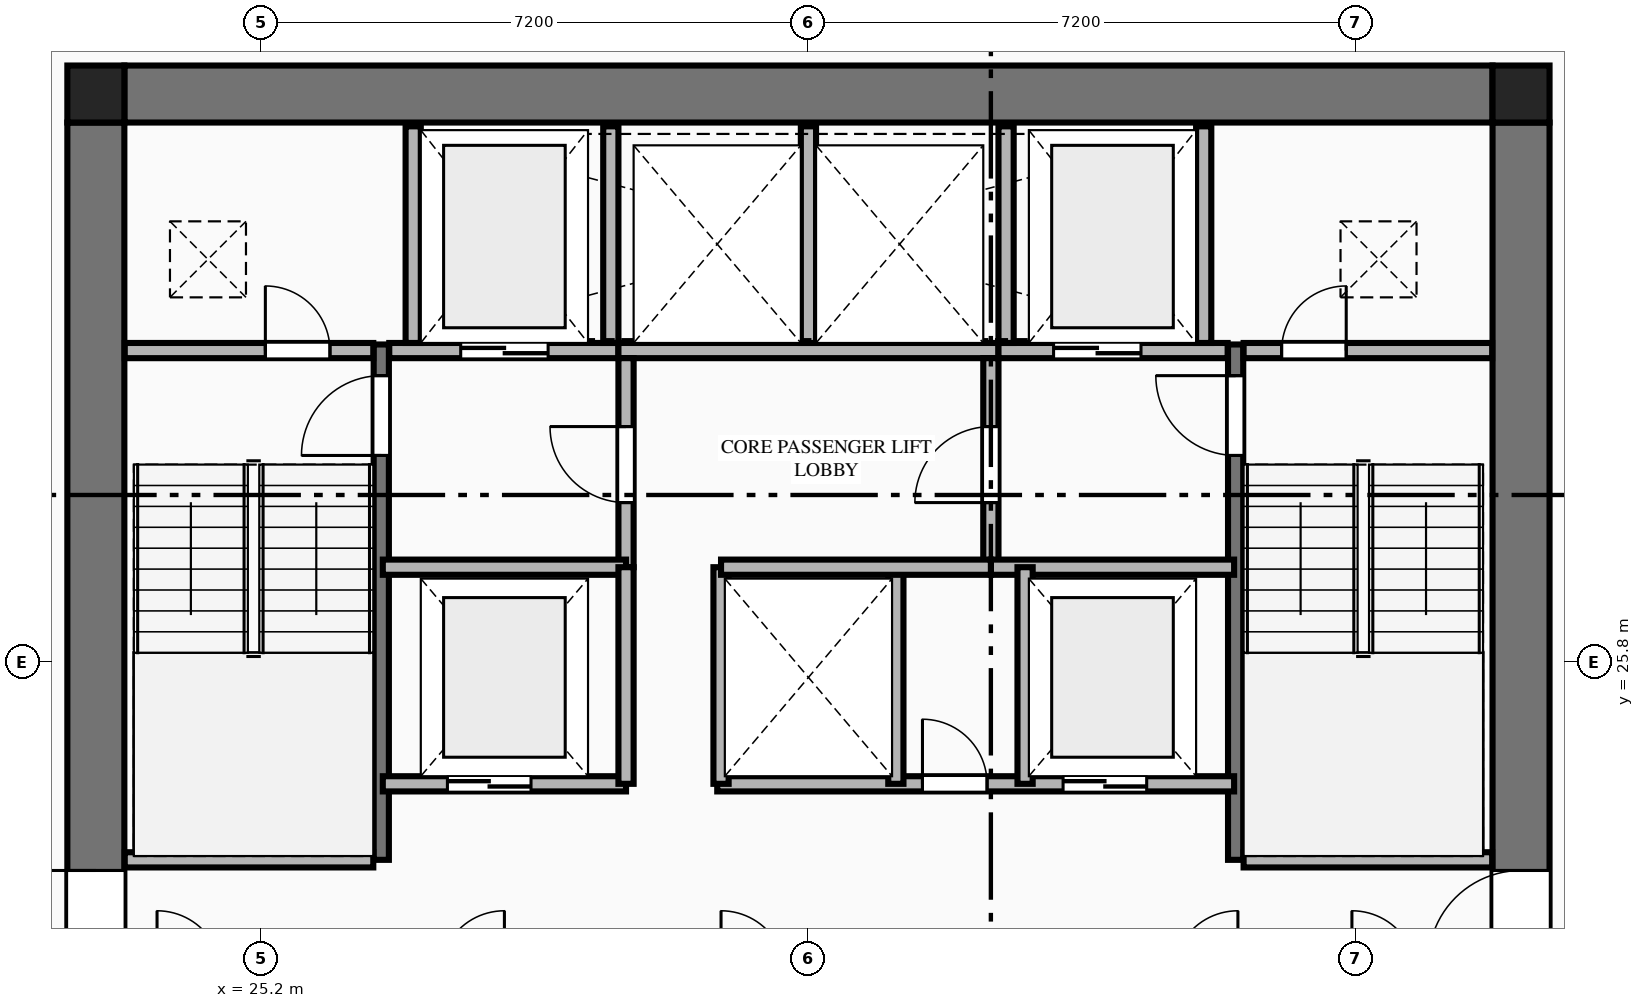
"""IFC4 building model, lengths in metres.
Left out: names, types, materials, properties, quantities, classifications, styles, units other than length and angle.
Written with IfcOpenShell. Run it as: python <this file> out.ifc"""

import sys

from ifc_helpers import new_model, si_unit, direction, frame, frame_2d, origin, origin_2d, place, context, subcontext, project, spatial, rectangle, extrude, element, fill, save


model = new_model("IFC4")
c1 = context("Model", 3, precision=1e-05, world=origin(), true_north=direction((0.0, 1.0)))
c2 = subcontext(c1, "Body", "Model", "MODEL_VIEW")
j1 = project(units=[si_unit("LENGTHUNIT", "METRE"), si_unit("PLANEANGLEUNIT", "RADIAN")], contexts=[c1])
p1 = place(None, origin())
s1 = spatial("IfcSite", under=j1, at=p1, CompositionType="ELEMENT")
p2 = place(p1, origin())
s2 = spatial("IfcBuilding", under=s1, at=p2, CompositionType="ELEMENT")
p3 = place(p2, frame((0.0, 0.0, 109.05)))
s3 = spatial("IfcBuildingStorey", under=s2, at=p3, CompositionType="ELEMENT", Elevation=109.05)
for number, where, z_axis, x_axis in (
    (1, (41.775, 33.275, 0.0), (0.0, 0.0, 1.0), (1.0, 0.0, 0.0)),
    (2, (23.025, 33.275, 0.0), (0.0, 0.0, 1.0), (1.0, 0.0, 0.0)),
):
    element("IfcColumn", number, at=place(p3, frame(where, z_axis=z_axis, x_axis=x_axis)), inside=s3, PredefinedType="COLUMN", context=c2, shape_type="SweptSolid", body=[
        extrude(rectangle(XDim=0.75, YDim=0.75, at=origin_2d()), origin(), (0.0, 0.0, 1.0), 3.55),
    ])
p4 = place(p3, frame((23.4, 33.275, 0.0), z_axis=(0.0, 0.0, 1.0), x_axis=(1.0, 0.0, 0.0)))
e3 = element("IfcWall", 3, at=p4, inside=s3, PredefinedType="SHEAR", context=c2, shape_type="SweptSolid", body=[
    extrude(rectangle(XDim=18.0, YDim=0.75, at=frame_2d((9.0, 0.0))), origin(), (0.0, 0.0, 1.0), 3.34),
])
p5 = place(p3, frame((23.025, 18.9, 0.0), z_axis=(0.0, 0.0, 1.0), x_axis=(0.0, 1.0, 0.0)))
e4 = element("IfcWall", 4, at=p5, inside=s3, PredefinedType="SHEAR", context=c2, shape_type="SweptSolid", body=[
    extrude(rectangle(XDim=14.0, YDim=0.75, at=frame_2d((7.0, 0.0))), origin(), (0.0, 0.0, 1.0), 3.34),
])
p6 = place(p5, frame((2.94, 0.0, 0.0)))
e5 = element("IfcOpeningElement", 5, at=p6, cuts=e4, PredefinedType="OPENING", context=c2, shape_type="SweptSolid", body=[
    extrude(rectangle(XDim=1.22, YDim=2.25, at=frame_2d((0.61, 1.125))), frame((0.0, 0.385, 0.0), z_axis=(0.0, -1.0, 0.0), x_axis=(1.0, 0.0, 0.0)), (0.0, 0.0, 1.0), 0.77),
])
p7 = place(p3, frame((41.775, 18.9, 0.0), z_axis=(0.0, 0.0, 1.0), x_axis=(0.0, 1.0, 0.0)))
e6 = element("IfcWall", 6, at=p7, inside=s3, PredefinedType="SHEAR", context=c2, shape_type="SweptSolid", body=[
    extrude(rectangle(XDim=14.0, YDim=0.75, at=frame_2d((7.0, 0.0))), origin(), (0.0, 0.0, 1.0), 3.34),
])
p8 = place(p7, frame((2.94, 0.0, 0.0)))
e7 = element("IfcOpeningElement", 7, at=p8, cuts=e6, PredefinedType="OPENING", context=c2, shape_type="SweptSolid", body=[
    extrude(rectangle(XDim=1.22, YDim=2.25, at=frame_2d((0.61, 1.125))), frame((0.0, 0.385, 0.0), z_axis=(0.0, -1.0, 0.0), x_axis=(1.0, 0.0, 0.0)), (0.0, 0.0, 1.0), 0.77),
])
p9 = place(p3, frame((26.78, 23.2, 0.0), z_axis=(0.0, 0.0, 1.0), x_axis=(0.0, 1.0, 0.0)))
e8 = element("IfcWall", 8, at=p9, inside=s3, PredefinedType="SHEAR", context=c2, shape_type="SweptSolid", body=[
    extrude(rectangle(XDim=6.78, YDim=0.2, at=frame_2d((3.39, 0.0))), origin(), (0.0, 0.0, 1.0), 3.55),
])
p10 = place(p9, frame((5.32, 0.0, 0.0)))
e9 = element("IfcOpeningElement", 9, at=p10, cuts=e8, PredefinedType="OPENING", context=c2, shape_type="SweptSolid", body=[
    extrude(rectangle(XDim=1.05, YDim=2.15, at=frame_2d((0.525, 1.075))), frame((0.0, 0.11, 0.0), z_axis=(0.0, -1.0, 0.0), x_axis=(1.0, 0.0, 0.0)), (0.0, 0.0, 1.0), 0.22),
])
p11 = place(p3, frame((23.405, 23.2, 0.0), z_axis=(0.0, 0.0, 1.0), x_axis=(1.0, 0.0, 0.0)))
e10 = element("IfcWall", 10, at=p11, inside=s3, PredefinedType="PLUMBINGWALL", context=c2, shape_type="SweptSolid", body=[
    extrude(rectangle(XDim=3.27, YDim=0.2, at=frame_2d((1.635, 0.0))), origin(), (0.0, 0.0, 1.0), 3.34),
])
p12 = place(p3, frame((38.02, 23.2, 0.0), z_axis=(0.0, 0.0, 1.0), x_axis=(0.0, 1.0, 0.0)))
e11 = element("IfcWall", 11, at=p12, inside=s3, PredefinedType="SHEAR", context=c2, shape_type="SweptSolid", body=[
    extrude(rectangle(XDim=6.78, YDim=0.2, at=frame_2d((3.39, 0.0))), origin(), (0.0, 0.0, 1.0), 3.55),
])
p13 = place(p12, frame((5.32, 0.0, 0.0)))
e12 = element("IfcOpeningElement", 12, at=p13, cuts=e11, PredefinedType="OPENING", context=c2, shape_type="SweptSolid", body=[
    extrude(rectangle(XDim=1.05, YDim=2.15, at=frame_2d((0.525, 1.075))), frame((0.0, 0.11, 0.0), z_axis=(0.0, -1.0, 0.0), x_axis=(1.0, 0.0, 0.0)), (0.0, 0.0, 1.0), 0.22),
])
p14 = place(p3, frame((38.125, 23.2, 0.0), z_axis=(0.0, 0.0, 1.0), x_axis=(1.0, 0.0, 0.0)))
e13 = element("IfcWall", 13, at=p14, inside=s3, PredefinedType="PLUMBINGWALL", context=c2, shape_type="SweptSolid", body=[
    extrude(rectangle(XDim=3.27, YDim=0.2, at=frame_2d((1.635, 0.0))), origin(), (0.0, 0.0, 1.0), 3.34),
])
p15 = place(p3, frame((23.405, 29.9, 0.0), z_axis=(0.0, 0.0, 1.0), x_axis=(1.0, 0.0, 0.0)))
e14 = element("IfcWall", 14, at=p15, inside=s3, PredefinedType="PLUMBINGWALL", context=c2, shape_type="SweptSolid", body=[
    extrude(rectangle(XDim=3.27, YDim=0.2, at=frame_2d((1.635, 0.0))), origin(), (0.0, 0.0, 1.0), 3.34),
])
p16 = place(p15, frame((1.85, 0.0, 0.0)))
e15 = element("IfcOpeningElement", 15, at=p16, cuts=e14, PredefinedType="OPENING", context=c2, shape_type="SweptSolid", body=[
    extrude(rectangle(XDim=0.85, YDim=2.05, at=frame_2d((0.425, 1.025))), frame((0.0, 0.11, 0.0), z_axis=(0.0, -1.0, 0.0), x_axis=(1.0, 0.0, 0.0)), (0.0, 0.0, 1.0), 0.22),
])
p17 = place(p3, frame((26.885, 29.9, 0.0), z_axis=(0.0, 0.0, 1.0), x_axis=(1.0, 0.0, 0.0)))
e16 = element("IfcWall", 16, at=p17, inside=s3, PredefinedType="PLUMBINGWALL", context=c2, shape_type="SweptSolid", body=[
    extrude(rectangle(XDim=3.015, YDim=0.2, at=frame_2d((1.507, 0.0))), origin(), (0.0, 0.0, 1.0), 3.34),
])
p18 = place(p17, frame((0.94, 0.0, 0.0)))
e17 = element("IfcOpeningElement", 17, at=p18, cuts=e16, PredefinedType="OPENING", context=c2, shape_type="SweptSolid", body=[
    extrude(rectangle(XDim=1.15, YDim=2.2, at=frame_2d((0.575, 1.1))), frame((0.0, 0.11, 0.0), z_axis=(0.0, -1.0, 0.0), x_axis=(1.0, 0.0, 0.0)), (0.0, 0.0, 1.0), 0.22),
])
p19 = place(p3, frame((29.9, 29.9, 0.0), z_axis=(0.0, 0.0, 1.0), x_axis=(1.0, 0.0, 0.0)))
e18 = element("IfcWall", 18, at=p19, inside=s3, PredefinedType="PLUMBINGWALL", context=c2, shape_type="SweptSolid", body=[
    extrude(rectangle(XDim=5.0, YDim=0.2, at=frame_2d((2.5, 0.0))), origin(), (0.0, 0.0, 1.0), 3.34),
])
p20 = place(p3, frame((34.9, 29.9, 0.0), z_axis=(0.0, 0.0, 1.0), x_axis=(1.0, 0.0, 0.0)))
e19 = element("IfcWall", 19, at=p20, inside=s3, PredefinedType="PLUMBINGWALL", context=c2, shape_type="SweptSolid", body=[
    extrude(rectangle(XDim=3.015, YDim=0.2, at=frame_2d((1.508, 0.0))), origin(), (0.0, 0.0, 1.0), 3.34),
])
p21 = place(p20, frame((0.725, 0.0, 0.0)))
e20 = element("IfcOpeningElement", 20, at=p21, cuts=e19, PredefinedType="OPENING", context=c2, shape_type="SweptSolid", body=[
    extrude(rectangle(XDim=1.15, YDim=2.2, at=frame_2d((0.575, 1.1))), frame((0.0, 0.11, 0.0), z_axis=(0.0, -1.0, 0.0), x_axis=(1.0, 0.0, 0.0)), (0.0, 0.0, 1.0), 0.22),
])
p22 = place(p3, frame((38.125, 29.9, 0.0), z_axis=(0.0, 0.0, 1.0), x_axis=(1.0, 0.0, 0.0)))
e21 = element("IfcWall", 21, at=p22, inside=s3, PredefinedType="PLUMBINGWALL", context=c2, shape_type="SweptSolid", body=[
    extrude(rectangle(XDim=3.27, YDim=0.2, at=frame_2d((1.635, 0.0))), origin(), (0.0, 0.0, 1.0), 3.34),
])
p23 = place(p22, frame((0.5, 0.0, 0.0)))
e22 = element("IfcOpeningElement", 22, at=p23, cuts=e21, PredefinedType="OPENING", context=c2, shape_type="SweptSolid", body=[
    extrude(rectangle(XDim=0.85, YDim=2.05, at=frame_2d((0.425, 1.025))), frame((0.0, 0.11, 0.0), z_axis=(0.0, -1.0, 0.0), x_axis=(1.0, 0.0, 0.0)), (0.0, 0.0, 1.0), 0.22),
])
for number, where, z_axis, x_axis in (
    (23, (27.2, 30.0, 0.0), (0.0, 0.0, 1.0), (0.0, 1.0, 0.0)),
    (24, (29.8, 30.0, 0.0), (0.0, 0.0, 1.0), (0.0, 1.0, 0.0)),
    (25, (32.4, 30.0, 0.0), (0.0, 0.0, 1.0), (0.0, 1.0, 0.0)),
    (26, (35.0, 30.0, 0.0), (0.0, 0.0, 1.0), (0.0, 1.0, 0.0)),
    (27, (37.6, 30.0, 0.0), (0.0, 0.0, 1.0), (0.0, 1.0, 0.0)),
):
    element("IfcWall", number, at=place(p3, frame(where, z_axis=z_axis, x_axis=x_axis)), inside=s3, PredefinedType="PLUMBINGWALL", context=c2, shape_type="SweptSolid", body=[
        extrude(rectangle(XDim=2.85, YDim=0.2, at=frame_2d((1.425, 0.0))), origin(), (0.0, 0.0, 1.0), 3.34),
    ])
p24 = place(p3, frame((30.0, 27.05, 0.0), z_axis=(0.0, 0.0, 1.0), x_axis=(0.0, 1.0, 0.0)))
e28 = element("IfcWall", 28, at=p24, inside=s3, PredefinedType="PLUMBINGWALL", context=c2, shape_type="SweptSolid", body=[
    extrude(rectangle(XDim=2.75, YDim=0.2, at=frame_2d((1.375, 0.0))), origin(), (0.0, 0.0, 1.0), 3.34),
])
p25 = place(p24, frame((0.85, 0.0, 0.0)))
e29 = element("IfcOpeningElement", 29, at=p25, cuts=e28, PredefinedType="OPENING", context=c2, shape_type="SweptSolid", body=[
    extrude(rectangle(XDim=1.0, YDim=2.15, at=frame_2d((0.5, 1.075))), frame((0.0, 0.11, 0.0), z_axis=(0.0, -1.0, 0.0), x_axis=(1.0, 0.0, 0.0)), (0.0, 0.0, 1.0), 0.22),
])
p26 = place(p3, frame((26.8, 27.05, 0.0), z_axis=(0.0, 0.0, 1.0), x_axis=(1.0, 0.0, 0.0)))
e30 = element("IfcWall", 30, at=p26, inside=s3, PredefinedType="PLUMBINGWALL", context=c2, shape_type="SweptSolid", body=[
    extrude(rectangle(XDim=3.2, YDim=0.2, at=frame_2d((1.6, 0.0))), origin(), (0.0, 0.0, 1.0), 3.34),
])
p27 = place(p3, frame((34.8, 27.05, 0.0), z_axis=(0.0, 0.0, 1.0), x_axis=(0.0, 1.0, 0.0)))
e31 = element("IfcWall", 31, at=p27, inside=s3, PredefinedType="PLUMBINGWALL", context=c2, shape_type="SweptSolid", body=[
    extrude(rectangle(XDim=2.75, YDim=0.2, at=frame_2d((1.375, 0.0))), origin(), (0.0, 0.0, 1.0), 3.34),
])
p28 = place(p27, frame((0.85, 0.0, 0.0)))
e32 = element("IfcOpeningElement", 32, at=p28, cuts=e31, PredefinedType="OPENING", context=c2, shape_type="SweptSolid", body=[
    extrude(rectangle(XDim=1.0, YDim=2.15, at=frame_2d((0.5, 1.075))), frame((0.0, 0.11, 0.0), z_axis=(0.0, -1.0, 0.0), x_axis=(1.0, 0.0, 0.0)), (0.0, 0.0, 1.0), 0.22),
])
p29 = place(p3, frame((34.8, 27.05, 0.0), z_axis=(0.0, 0.0, 1.0), x_axis=(1.0, 0.0, 0.0)))
e33 = element("IfcWall", 33, at=p29, inside=s3, PredefinedType="PLUMBINGWALL", context=c2, shape_type="SweptSolid", body=[
    extrude(rectangle(XDim=3.2, YDim=0.2, at=frame_2d((1.6, 0.0))), origin(), (0.0, 0.0, 1.0), 3.34),
])
p30 = place(p3, frame((26.8, 24.2, 0.0), z_axis=(0.0, 0.0, 1.0), x_axis=(1.0, 0.0, 0.0)))
e34 = element("IfcWall", 34, at=p30, inside=s3, PredefinedType="PLUMBINGWALL", context=c2, shape_type="SweptSolid", body=[
    extrude(rectangle(XDim=3.2, YDim=0.2, at=frame_2d((1.6, 0.0))), origin(), (0.0, 0.0, 1.0), 3.34),
])
p31 = place(p30, frame((0.85, 0.0, 0.0)))
e35 = element("IfcOpeningElement", 35, at=p31, cuts=e34, PredefinedType="OPENING", context=c2, shape_type="SweptSolid", body=[
    extrude(rectangle(XDim=1.1, YDim=2.2, at=frame_2d((0.55, 1.1))), frame((0.0, 0.11, 0.0), z_axis=(0.0, -1.0, 0.0), x_axis=(1.0, 0.0, 0.0)), (0.0, 0.0, 1.0), 0.22),
])
p32 = place(p3, frame((30.0, 24.2, 0.0), z_axis=(0.0, 0.0, 1.0), x_axis=(0.0, 1.0, 0.0)))
e36 = element("IfcWall", 36, at=p32, inside=s3, PredefinedType="PLUMBINGWALL", context=c2, shape_type="SweptSolid", body=[
    extrude(rectangle(XDim=2.85, YDim=0.2, at=frame_2d((1.425, 0.0))), origin(), (0.0, 0.0, 1.0), 3.34),
])
p33 = place(p3, frame((31.2, 24.2, 0.0), z_axis=(0.0, 0.0, 1.0), x_axis=(1.0, 0.0, 0.0)))
e37 = element("IfcWall", 37, at=p33, inside=s3, PredefinedType="PLUMBINGWALL", context=c2, shape_type="SweptSolid", body=[
    extrude(rectangle(XDim=6.8, YDim=0.2, at=frame_2d((3.4, 0.0))), origin(), (0.0, 0.0, 1.0), 3.34),
])
p34 = place(p33, frame((2.7, 0.0, 0.0)))
e38 = element("IfcOpeningElement", 38, at=p34, cuts=e37, PredefinedType="OPENING", context=c2, shape_type="SweptSolid", body=[
    extrude(rectangle(XDim=0.85, YDim=2.05, at=frame_2d((0.425, 1.025))), frame((0.0, 0.11, 0.0), z_axis=(0.0, -1.0, 0.0), x_axis=(1.0, 0.0, 0.0)), (0.0, 0.0, 1.0), 0.22),
])
p35 = place(p33, frame((4.55, 0.0, 0.0)))
e39 = element("IfcOpeningElement", 39, at=p35, cuts=e37, PredefinedType="OPENING", context=c2, shape_type="SweptSolid", body=[
    extrude(rectangle(XDim=1.1, YDim=2.2, at=frame_2d((0.55, 1.1))), frame((0.0, 0.11, 0.0), z_axis=(0.0, -1.0, 0.0), x_axis=(1.0, 0.0, 0.0)), (0.0, 0.0, 1.0), 0.22),
])
for number, where, z_axis, x_axis in (
    (40, (31.25, 24.2, 0.0), (0.0, 0.0, 1.0), (0.0, 1.0, 0.0)),
    (41, (33.55, 24.2, 0.0), (0.0, 0.0, 1.0), (0.0, 1.0, 0.0)),
    (42, (35.25, 24.2, 0.0), (0.0, 0.0, 1.0), (0.0, 1.0, 0.0)),
):
    element("IfcWall", number, at=place(p3, frame(where, z_axis=z_axis, x_axis=x_axis)), inside=s3, PredefinedType="PLUMBINGWALL", context=c2, shape_type="SweptSolid", body=[
        extrude(rectangle(XDim=2.85, YDim=0.2, at=frame_2d((1.425, 0.0))), origin(), (0.0, 0.0, 1.0), 3.34),
    ])
p36 = place(p3, frame((31.25, 27.05, 0.0), z_axis=(0.0, 0.0, 1.0), x_axis=(1.0, 0.0, 0.0)))
e43 = element("IfcWall", 43, at=p36, inside=s3, PredefinedType="PLUMBINGWALL", context=c2, shape_type="SweptSolid", body=[
    extrude(rectangle(XDim=3.55, YDim=0.2, at=frame_2d((1.775, 0.0))), origin(), (0.0, 0.0, 1.0), 3.34),
])
p37 = place(p6, origin())
e44 = element("IfcDoor", 44, at=p37, inside=s3, OperationType="SINGLE_SWING_RIGHT", PredefinedType="DOOR", context=c2, shape_type="SweptSolid", body=[
    extrude(rectangle(XDim=1.22, YDim=2.25, at=frame_2d((0.61, 1.125))), frame((0.0, 0.025, 0.0), z_axis=(0.0, -1.0, 0.0), x_axis=(1.0, 0.0, 0.0)), (0.0, 0.0, 1.0), 0.05),
])
fill(e5, e44)
p38 = place(p8, origin())
e45 = element("IfcDoor", 45, at=p38, inside=s3, OperationType="SINGLE_SWING_LEFT", PredefinedType="DOOR", context=c2, shape_type="SweptSolid", body=[
    extrude(rectangle(XDim=1.22, YDim=2.25, at=frame_2d((0.61, 1.125))), frame((0.0, 0.025, 0.0), z_axis=(0.0, -1.0, 0.0), x_axis=(1.0, 0.0, 0.0)), (0.0, 0.0, 1.0), 0.05),
])
fill(e7, e45)
p39 = place(p10, origin())
e46 = element("IfcDoor", 46, at=p39, inside=s3, OperationType="SINGLE_SWING_LEFT", PredefinedType="DOOR", context=c2, shape_type="SweptSolid", body=[
    extrude(rectangle(XDim=1.05, YDim=2.15, at=frame_2d((0.525, 1.075))), frame((0.0, 0.025, 0.0), z_axis=(0.0, -1.0, 0.0), x_axis=(1.0, 0.0, 0.0)), (0.0, 0.0, 1.0), 0.05),
])
fill(e9, e46)
p40 = place(p13, origin())
e47 = element("IfcDoor", 47, at=p40, inside=s3, OperationType="SINGLE_SWING_RIGHT", PredefinedType="DOOR", context=c2, shape_type="SweptSolid", body=[
    extrude(rectangle(XDim=1.05, YDim=2.15, at=frame_2d((0.525, 1.075))), frame((0.0, 0.025, 0.0), z_axis=(0.0, -1.0, 0.0), x_axis=(1.0, 0.0, 0.0)), (0.0, 0.0, 1.0), 0.05),
])
fill(e12, e47)
p41 = place(p16, origin())
e48 = element("IfcDoor", 48, at=p41, inside=s3, OperationType="SINGLE_SWING_LEFT", PredefinedType="DOOR", context=c2, shape_type="SweptSolid", body=[
    extrude(rectangle(XDim=0.85, YDim=2.05, at=frame_2d((0.425, 1.025))), frame((0.0, 0.025, 0.0), z_axis=(0.0, -1.0, 0.0), x_axis=(1.0, 0.0, 0.0)), (0.0, 0.0, 1.0), 0.05),
])
fill(e15, e48)
p42 = place(p23, origin())
e49 = element("IfcDoor", 49, at=p42, inside=s3, OperationType="SINGLE_SWING_RIGHT", PredefinedType="DOOR", context=c2, shape_type="SweptSolid", body=[
    extrude(rectangle(XDim=0.85, YDim=2.05, at=frame_2d((0.425, 1.025))), frame((0.0, 0.025, 0.0), z_axis=(0.0, -1.0, 0.0), x_axis=(1.0, 0.0, 0.0)), (0.0, 0.0, 1.0), 0.05),
])
fill(e22, e49)
p43 = place(p18, origin())
e50 = element("IfcDoor", 50, at=p43, inside=s3, OperationType="DOUBLE_DOOR_SLIDING", PredefinedType="DOOR", context=c2, shape_type="SweptSolid", body=[
    extrude(rectangle(XDim=1.15, YDim=2.2, at=frame_2d((0.575, 1.1))), frame((0.0, 0.025, 0.0), z_axis=(0.0, -1.0, 0.0), x_axis=(1.0, 0.0, 0.0)), (0.0, 0.0, 1.0), 0.05),
])
fill(e17, e50)
p44 = place(p21, origin())
e51 = element("IfcDoor", 51, at=p44, inside=s3, OperationType="DOUBLE_DOOR_SLIDING", PredefinedType="DOOR", context=c2, shape_type="SweptSolid", body=[
    extrude(rectangle(XDim=1.15, YDim=2.2, at=frame_2d((0.575, 1.1))), frame((0.0, 0.025, 0.0), z_axis=(0.0, -1.0, 0.0), x_axis=(1.0, 0.0, 0.0)), (0.0, 0.0, 1.0), 0.05),
])
fill(e20, e51)
p45 = place(p25, origin())
e52 = element("IfcDoor", 52, at=p45, inside=s3, OperationType="SINGLE_SWING_RIGHT", PredefinedType="DOOR", context=c2, shape_type="SweptSolid", body=[
    extrude(rectangle(XDim=1.0, YDim=2.15, at=frame_2d((0.5, 1.075))), frame((0.0, 0.025, 0.0), z_axis=(0.0, -1.0, 0.0), x_axis=(1.0, 0.0, 0.0)), (0.0, 0.0, 1.0), 0.05),
])
fill(e29, e52)
p46 = place(p28, origin())
e53 = element("IfcDoor", 53, at=p46, inside=s3, OperationType="SINGLE_SWING_LEFT", PredefinedType="DOOR", context=c2, shape_type="SweptSolid", body=[
    extrude(rectangle(XDim=1.0, YDim=2.15, at=frame_2d((0.5, 1.075))), frame((0.0, 0.025, 0.0), z_axis=(0.0, -1.0, 0.0), x_axis=(1.0, 0.0, 0.0)), (0.0, 0.0, 1.0), 0.05),
])
fill(e32, e53)
p47 = place(p31, origin())
e54 = element("IfcDoor", 54, at=p47, inside=s3, OperationType="DOUBLE_DOOR_SLIDING", PredefinedType="DOOR", context=c2, shape_type="SweptSolid", body=[
    extrude(rectangle(XDim=1.1, YDim=2.2, at=frame_2d((0.55, 1.1))), frame((0.0, 0.025, 0.0), z_axis=(0.0, -1.0, 0.0), x_axis=(1.0, 0.0, 0.0)), (0.0, 0.0, 1.0), 0.05),
])
fill(e35, e54)
p48 = place(p34, origin())
e55 = element("IfcDoor", 55, at=p48, inside=s3, OperationType="SINGLE_SWING_LEFT", PredefinedType="DOOR", context=c2, shape_type="SweptSolid", body=[
    extrude(rectangle(XDim=0.85, YDim=2.05, at=frame_2d((0.425, 1.025))), frame((0.0, 0.025, 0.0), z_axis=(0.0, -1.0, 0.0), x_axis=(1.0, 0.0, 0.0)), (0.0, 0.0, 1.0), 0.05),
])
fill(e38, e55)
p49 = place(p35, origin())
e56 = element("IfcDoor", 56, at=p49, inside=s3, OperationType="DOUBLE_DOOR_SLIDING", PredefinedType="DOOR", context=c2, shape_type="SweptSolid", body=[
    extrude(rectangle(XDim=1.1, YDim=2.2, at=frame_2d((0.55, 1.1))), frame((0.0, 0.025, 0.0), z_axis=(0.0, -1.0, 0.0), x_axis=(1.0, 0.0, 0.0)), (0.0, 0.0, 1.0), 0.05),
])
fill(e39, e56)
save(model, sys.argv[1])
